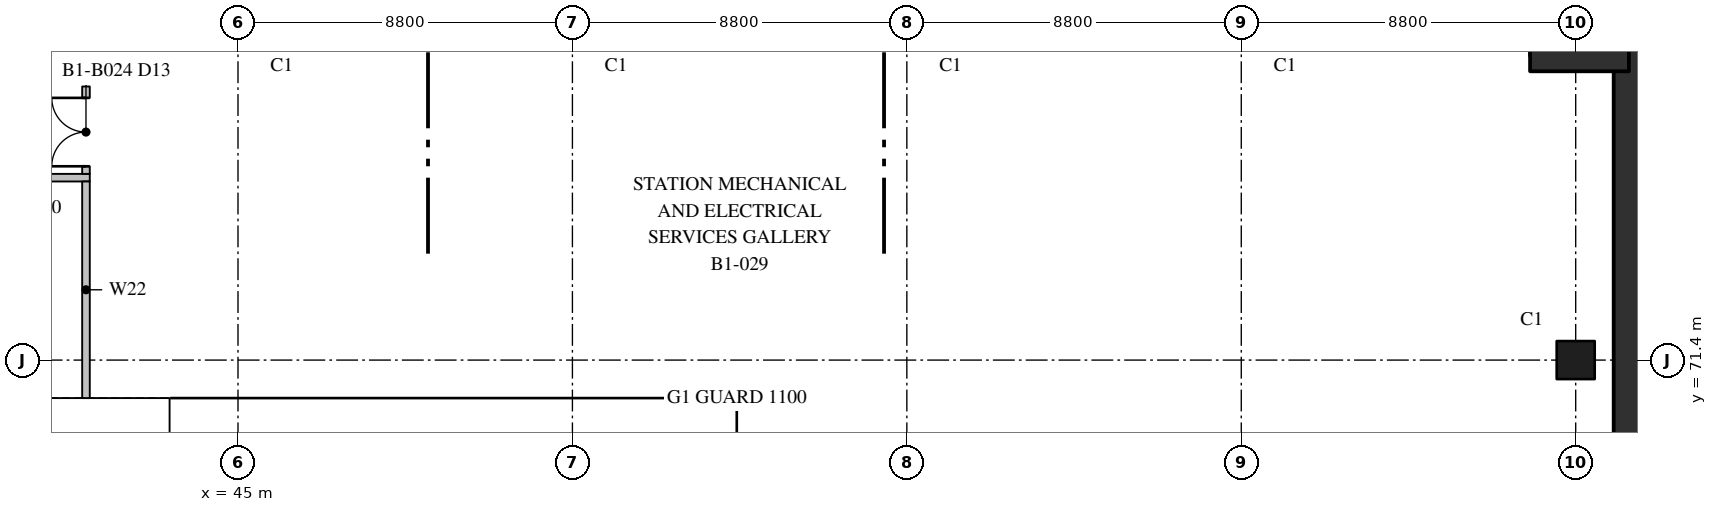
"""IFC4 building model, lengths in metres.
Left out: names, types, materials, properties, quantities, classifications, styles, units other than length and angle.
Written with IfcOpenShell. Run it as: python <this file> out.ifc"""

import sys

from ifc_helpers import new_model, si_unit, direction, frame, frame_2d, origin, origin_2d, place, context, subcontext, project, spatial, rectangle, extrude, element, fill, save


model = new_model("IFC4")
c1 = context("Model", 3, precision=1e-05, world=origin(), true_north=direction((0.0, 1.0)))
c2 = subcontext(c1, "Body", "Model", "MODEL_VIEW")
j1 = project(units=[si_unit("LENGTHUNIT", "METRE"), si_unit("PLANEANGLEUNIT", "RADIAN")], contexts=[c1])
p1 = place(None, origin())
s1 = spatial("IfcSite", under=j1, at=p1, CompositionType="ELEMENT")
p2 = place(p1, origin())
s2 = spatial("IfcBuilding", under=s1, at=p2, CompositionType="ELEMENT")
p3 = place(p2, frame((0.0, 0.0, -7.0)))
s3 = spatial("IfcBuildingStorey", under=s2, at=p3, CompositionType="ELEMENT", Elevation=-7.0)
p4 = place(p3, frame((80.2, 71.4, 0.0), z_axis=(0.0, 0.0, 1.0), x_axis=(1.0, 0.0, 0.0)))
e1 = element("IfcColumn", 1, at=p4, inside=s3, PredefinedType="COLUMN", context=c2, shape_type="SweptSolid", body=[
    extrude(rectangle(XDim=1.0, YDim=1.0, at=origin_2d()), origin(), (0.0, 0.0, 1.0), 7.0),
])
p5 = place(p3, frame((81.6, 79.8, 0.0), z_axis=(0.0, 0.0, 1.0), x_axis=(0.0, -1.0, 0.0)))
e2 = element("IfcWall", 2, at=p5, inside=s3, PredefinedType="SHEAR", context=c2, shape_type="SweptSolid", body=[
    extrude(rectangle(XDim=15.6, YDim=0.8, at=frame_2d((7.8, 0.0))), origin(), (0.0, 0.0, 1.0), 7.0),
])
for number, where, z_axis, x_axis in (
    (3, (79.4, 82.0, 0.0), (0.0, 0.0, 1.0), (0.0, -1.0, 0.0)),
    (4, (79.0, 79.4, 0.0), (0.0, 0.0, 1.0), (1.0, 0.0, 0.0)),
):
    element("IfcWall", number, at=place(p3, frame(where, z_axis=z_axis, x_axis=x_axis)), inside=s3, PredefinedType="SHEAR", context=c2, shape_type="SweptSolid", body=[
        extrude(rectangle(XDim=2.6, YDim=0.8, at=frame_2d((1.3, 0.0))), origin(), (0.0, 0.0, 1.0), 7.0),
    ])
p6 = place(p3, frame((25.7, 76.2, 0.0), z_axis=(0.0, 0.0, 1.0), x_axis=(1.0, 0.0, 0.0)))
e5 = element("IfcWall", 5, at=p6, inside=s3, PredefinedType="PARTITIONING", context=c2, shape_type="SweptSolid", body=[
    extrude(rectangle(XDim=15.4, YDim=0.2, at=frame_2d((7.7, 0.0))), origin(), (0.0, 0.0, 1.0), 6.5),
])
p7 = place(p6, frame((12.7, 0.0, 0.0)))
e6 = element("IfcOpeningElement", 6, at=p7, cuts=e5, PredefinedType="OPENING", context=c2, shape_type="SweptSolid", body=[
    extrude(rectangle(XDim=1.0, YDim=2.1, at=frame_2d((0.5, 1.05))), frame((0.0, 0.11, 0.0), z_axis=(0.0, -1.0, 0.0), x_axis=(1.0, 0.0, 0.0)), (0.0, 0.0, 1.0), 0.22),
])
p8 = place(p3, frame((41.0, 70.4, 0.0), z_axis=(0.0, 0.0, 1.0), x_axis=(0.0, 1.0, 0.0)))
e7 = element("IfcWall", 7, at=p8, inside=s3, PredefinedType="PARTITIONING", context=c2, shape_type="SweptSolid", body=[
    extrude(rectangle(XDim=5.7, YDim=0.2, at=frame_2d((2.85, 0.0))), origin(), (0.0, 0.0, 1.0), 6.5),
])
p9 = place(p3, frame((41.0, 76.3, 0.0), z_axis=(0.0, 0.0, 1.0), x_axis=(0.0, 1.0, 0.0)))
e8 = element("IfcWall", 8, at=p9, inside=s3, PredefinedType="PARTITIONING", context=c2, shape_type="SweptSolid", body=[
    extrude(rectangle(XDim=2.3, YDim=0.2, at=frame_2d((1.15, 0.0))), origin(), (0.0, 0.0, 1.0), 6.5),
])
p10 = place(p9, frame((0.2, 0.0, 0.0)))
e9 = element("IfcOpeningElement", 9, at=p10, cuts=e8, PredefinedType="OPENING", context=c2, shape_type="SweptSolid", body=[
    extrude(rectangle(XDim=1.8, YDim=2.1, at=frame_2d((0.9, 1.05))), frame((0.0, 0.11, 0.0), z_axis=(0.0, -1.0, 0.0), x_axis=(1.0, 0.0, 0.0)), (0.0, 0.0, 1.0), 0.22),
])
p11 = place(p10, origin())
e10 = element("IfcDoor", 10, at=p11, inside=s3, OperationType="DOUBLE_DOOR_SINGLE_SWING", PredefinedType="DOOR", context=c2, shape_type="SweptSolid", body=[
    extrude(rectangle(XDim=1.8, YDim=2.1, at=frame_2d((0.9, 1.05))), frame((0.0, 0.025, 0.0), z_axis=(0.0, -1.0, 0.0), x_axis=(1.0, 0.0, 0.0)), (0.0, 0.0, 1.0), 0.05),
])
fill(e9, e10)
save(model, sys.argv[1])
